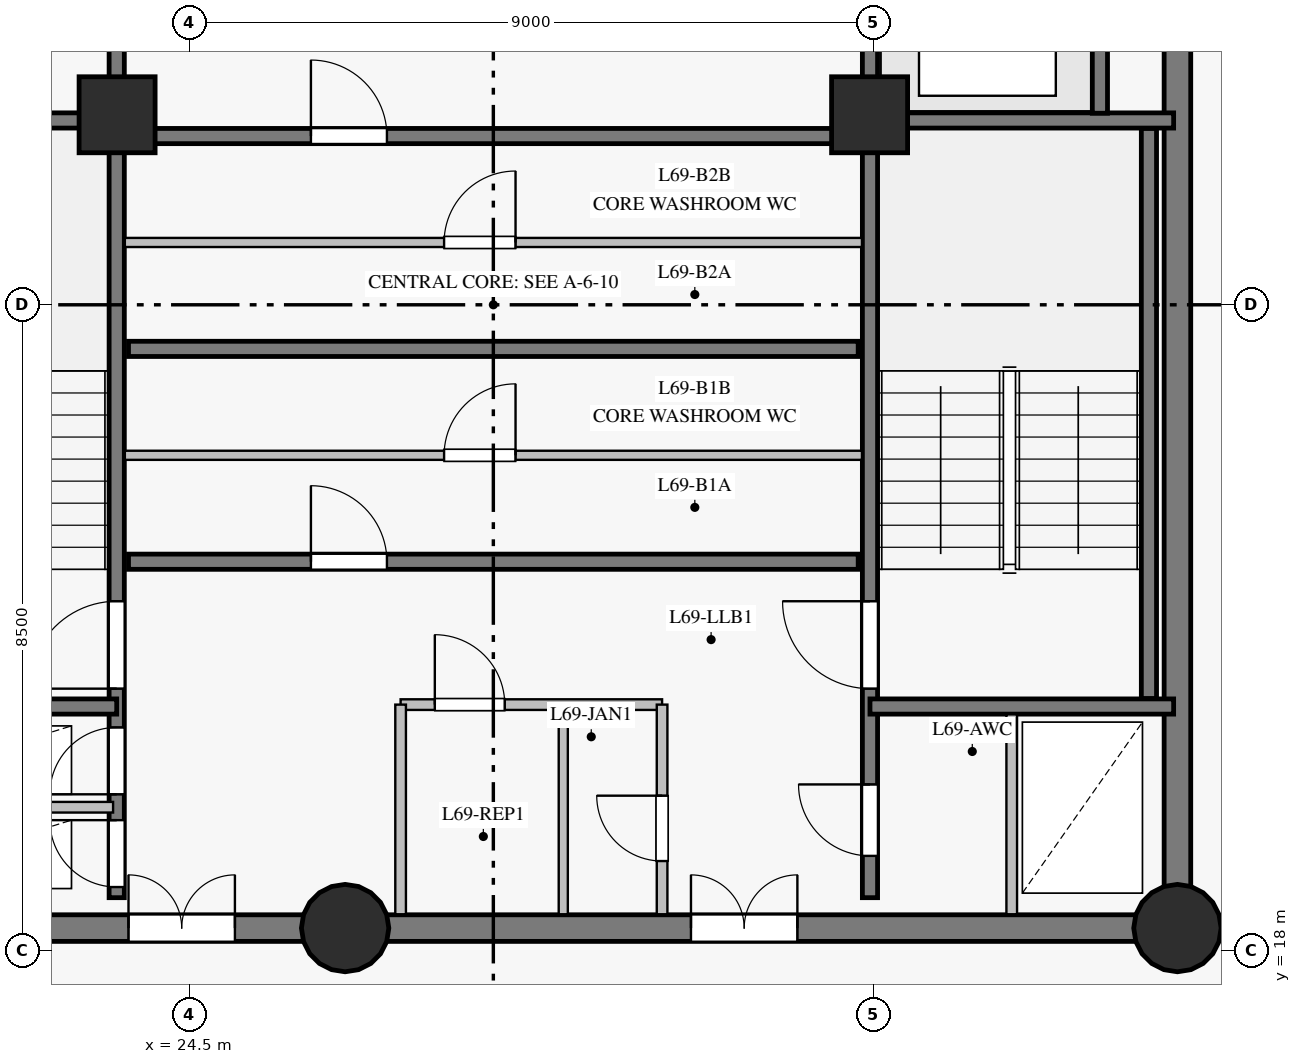
"""IFC4 building model, lengths in metres.
Left out: names, types, materials, properties, quantities, classifications, styles, units other than length and angle.
Written with IfcOpenShell. Run it as: python <this file> out.ifc"""

import sys

from ifc_helpers import new_model, si_unit, direction, frame, frame_2d, origin, origin_with_axes, origin_2d, place, context, subcontext, project, spatial, rectangle, circle, extrude, source, transform, mapped, element, fill, save


model = new_model("IFC4")
c1 = context("Model", 3, precision=1e-05, world=origin(), true_north=direction((0.0, 1.0)))
c2 = subcontext(c1, "Body", "Model", "MODEL_VIEW")
j1 = project(units=[si_unit("LENGTHUNIT", "METRE"), si_unit("PLANEANGLEUNIT", "RADIAN")], contexts=[c1])
p1 = place(None, origin())
s1 = spatial("IfcSite", under=j1, at=p1, CompositionType="ELEMENT")
p2 = place(p1, origin())
s2 = spatial("IfcBuilding", under=s1, at=p2, CompositionType="ELEMENT")
p3 = place(p2, frame((0.0, 0.0, 235.2)))
s3 = spatial("IfcBuildingStorey", under=s2, at=p3, CompositionType="ELEMENT", Elevation=235.2)
p4 = place(p3, frame((19.5, 18.3, 0.0), z_axis=(0.0, 0.0, 1.0), x_axis=(1.0, 0.0, 0.0)))
e1 = element("IfcWall", 1, at=p4, inside=s3, PredefinedType="SHEAR", context=c2, shape_type="SweptSolid", body=[
    extrude(rectangle(XDim=7.05, YDim=0.35, at=frame_2d((3.525, 0.0))), origin(), (0.0, 0.0, 1.0), 2.85),
])
p5 = place(p4, frame((4.2, 0.0, 0.0)))
e2 = element("IfcOpeningElement", 2, at=p5, cuts=e1, PredefinedType="OPENING", context=c2, shape_type="SweptSolid", body=[
    extrude(rectangle(XDim=1.4, YDim=2.2, at=frame_2d((0.7, 1.1))), frame((0.0, 0.185, 0.0), z_axis=(0.0, -1.0, 0.0), x_axis=(1.0, 0.0, 0.0)), (0.0, 0.0, 1.0), 0.37),
])
p6 = place(p3, frame((26.55, 18.3, 0.0), z_axis=(0.0, 0.0, 1.0), x_axis=(1.0, 0.0, 0.0)))
e3 = element("IfcWall", 3, at=p6, inside=s3, PredefinedType="SHEAR", context=c2, shape_type="SweptSolid", body=[
    extrude(rectangle(XDim=10.95, YDim=0.35, at=frame_2d((5.475, 0.0))), origin(), (0.0, 0.0, 1.0), 2.85),
])
p7 = place(p6, frame((4.55, 0.0, 0.0)))
e4 = element("IfcOpeningElement", 4, at=p7, cuts=e3, PredefinedType="OPENING", context=c2, shape_type="SweptSolid", body=[
    extrude(rectangle(XDim=1.4, YDim=2.2, at=frame_2d((0.7, 1.1))), frame((0.0, 0.185, 0.0), z_axis=(0.0, -1.0, 0.0), x_axis=(1.0, 0.0, 0.0)), (0.0, 0.0, 1.0), 0.37),
])
p8 = place(p3, frame((37.5, 18.3, 0.0), z_axis=(0.0, 0.0, 1.0), x_axis=(0.0, 1.0, 0.0)))
e5 = element("IfcWall", 5, at=p8, inside=s3, PredefinedType="SHEAR", context=c2, shape_type="SweptSolid", body=[
    extrude(rectangle(XDim=16.4, YDim=0.35, at=frame_2d((8.2, 0.0))), origin(), (0.0, 0.0, 1.0), 2.85),
])
p9 = place(p8, frame((13.85, 0.0, 0.0)))
e6 = element("IfcOpeningElement", 6, at=p9, cuts=e5, PredefinedType="OPENING", context=c2, shape_type="SweptSolid", body=[
    extrude(rectangle(XDim=1.2, YDim=2.15, at=frame_2d((0.6, 1.075))), frame((0.0, 0.185, 0.0), z_axis=(0.0, -1.0, 0.0), x_axis=(1.0, 0.0, 0.0)), (0.0, 0.0, 1.0), 0.37),
])
m1 = source(origin_with_axes(), c2, "Body", "SweptSolid", [
    extrude(circle(Radius=0.575, at=origin_2d()), origin(), (0.0, 0.0, 1.0), 3.05),
])
for number, where, z_axis, x_axis in (
    (7, (26.55, 18.3, 0.0), (0.0, 0.0, 1.0), (1.0, 0.0, 0.0)),
    (8, (37.5, 18.3, 0.0), (0.0, 0.0, 1.0), (1.0, 0.0, 0.0)),
):
    element("IfcColumn", number, at=place(p3, frame(where, z_axis=z_axis, x_axis=x_axis)), inside=s3, PredefinedType="COLUMN", context=c2, shape_type="MappedRepresentation", body=[
        mapped(m1, transform((0.0, 0.0, 0.0), scale=1.0)),
    ])
m2 = source(origin_with_axes(), c2, "Body", "SweptSolid", [
    extrude(rectangle(XDim=1.0, YDim=1.0, at=origin_2d()), origin(), (0.0, 0.0, 1.0), 3.05),
])
for number, where, z_axis, x_axis in (
    (9, (23.55, 29.0, 0.0), (0.0, 0.0, 1.0), (1.0, 0.0, 0.0)),
    (10, (33.45, 29.0, 0.0), (0.0, 0.0, 1.0), (1.0, 0.0, 0.0)),
):
    element("IfcColumn", number, at=place(p3, frame(where, z_axis=z_axis, x_axis=x_axis)), inside=s3, PredefinedType="COLUMN", context=c2, shape_type="MappedRepresentation", body=[
        mapped(m2, transform((0.0, 0.0, 0.0), scale=1.0)),
    ])
p10 = place(p3, frame((34.467, 7.916, 0.0), z_axis=(0.0, 0.0, 1.0), x_axis=(0.661518096325, 0.749929202148, 0.0)))
e11 = element("IfcWall", 11, at=p10, inside=s3, PredefinedType="SOLIDWALL", context=c2, shape_type="SweptSolid", body=[
    extrude(rectangle(XDim=18.952, YDim=0.28, at=frame_2d((9.476, 0.0))), origin(), (0.0, 0.0, 1.0), 2.85),
])
p11 = place(p10, frame((4.831, 0.0, 0.85)))
e12 = element("IfcOpeningElement", 12, at=p11, cuts=e11, PredefinedType="OPENING", context=c2, shape_type="SweptSolid", body=[
    extrude(rectangle(XDim=1.6, YDim=1.6, at=frame_2d((0.8, 0.8))), frame((0.0, 0.15, 0.0), z_axis=(0.0, -1.0, 0.0), x_axis=(1.0, 0.0, 0.0)), (0.0, 0.0, 1.0), 0.3),
])
p12 = place(p10, frame((12.161, 0.0, 0.85)))
e13 = element("IfcOpeningElement", 13, at=p12, cuts=e11, PredefinedType="OPENING", context=c2, shape_type="SweptSolid", body=[
    extrude(rectangle(XDim=1.6, YDim=1.6, at=frame_2d((0.8, 0.8))), frame((0.0, 0.15, 0.0), z_axis=(0.0, -1.0, 0.0), x_axis=(1.0, 0.0, 0.0)), (0.0, 0.0, 1.0), 0.3),
])
p13 = place(p10, frame((16.489, 0.0, 0.85)))
e14 = element("IfcOpeningElement", 14, at=p13, cuts=e11, PredefinedType="OPENING", context=c2, shape_type="SweptSolid", body=[
    extrude(rectangle(XDim=1.6, YDim=1.6, at=frame_2d((0.8, 0.8))), frame((0.0, 0.15, 0.0), z_axis=(0.0, -1.0, 0.0), x_axis=(1.0, 0.0, 0.0)), (0.0, 0.0, 1.0), 0.3),
])
p14 = place(p10, frame((1.844, 0.0, 0.0)))
e15 = element("IfcOpeningElement", 15, at=p14, cuts=e11, PredefinedType="OPENING", context=c2, shape_type="SweptSolid", body=[
    extrude(rectangle(XDim=1.05, YDim=2.12, at=frame_2d((0.525, 1.06))), frame((0.0, 0.15, 0.0), z_axis=(0.0, -1.0, 0.0), x_axis=(1.0, 0.0, 0.0)), (0.0, 0.0, 1.0), 0.3),
])
p15 = place(p3, frame((23.545, 18.7, 0.0), z_axis=(0.0, 0.0, 1.0), x_axis=(0.0, 1.0, 0.0)))
e16 = element("IfcWall", 16, at=p15, inside=s3, PredefinedType="SHEAR", context=c2, shape_type="SweptSolid", body=[
    extrude(rectangle(XDim=15.6, YDim=0.2, at=frame_2d((7.8, 0.0))), origin(), (0.0, 0.0, 1.0), 2.85),
])
p16 = place(p15, frame((2.75, 0.0, 0.0)))
e17 = element("IfcOpeningElement", 17, at=p16, cuts=e16, PredefinedType="OPENING", context=c2, shape_type="SweptSolid", body=[
    extrude(rectangle(XDim=1.15, YDim=2.15, at=frame_2d((0.575, 1.075))), frame((0.0, 0.11, 0.0), z_axis=(0.0, -1.0, 0.0), x_axis=(1.0, 0.0, 0.0)), (0.0, 0.0, 1.0), 0.22),
])
p17 = place(p15, frame((0.14, 0.0, 0.0)))
e18 = element("IfcOpeningElement", 18, at=p17, cuts=e16, PredefinedType="OPENING", context=c2, shape_type="SweptSolid", body=[
    extrude(rectangle(XDim=0.88, YDim=2.1, at=frame_2d((0.44, 1.05))), frame((0.0, 0.11, 0.0), z_axis=(0.0, -1.0, 0.0), x_axis=(1.0, 0.0, 0.0)), (0.0, 0.0, 1.0), 0.22),
])
p18 = place(p15, frame((1.36, 0.0, 0.0)))
e19 = element("IfcOpeningElement", 19, at=p18, cuts=e16, PredefinedType="OPENING", context=c2, shape_type="SweptSolid", body=[
    extrude(rectangle(XDim=0.88, YDim=2.1, at=frame_2d((0.44, 1.05))), frame((0.0, 0.11, 0.0), z_axis=(0.0, -1.0, 0.0), x_axis=(1.0, 0.0, 0.0)), (0.0, 0.0, 1.0), 0.22),
])
p19 = place(p15, frame((12.1, 0.0, 0.0)))
e20 = element("IfcOpeningElement", 20, at=p19, cuts=e16, PredefinedType="OPENING", context=c2, shape_type="SweptSolid", body=[
    extrude(rectangle(XDim=1.12, YDim=2.15, at=frame_2d((0.56, 1.075))), frame((0.0, 0.11, 0.0), z_axis=(0.0, -1.0, 0.0), x_axis=(1.0, 0.0, 0.0)), (0.0, 0.0, 1.0), 0.22),
])
p20 = place(p15, frame((14.05, 0.0, 0.0)))
e21 = element("IfcOpeningElement", 21, at=p20, cuts=e16, PredefinedType="OPENING", context=c2, shape_type="SweptSolid", body=[
    extrude(rectangle(XDim=1.12, YDim=2.15, at=frame_2d((0.56, 1.075))), frame((0.0, 0.11, 0.0), z_axis=(0.0, -1.0, 0.0), x_axis=(1.0, 0.0, 0.0)), (0.0, 0.0, 1.0), 0.22),
])
p21 = place(p3, frame((33.455, 18.7, 0.0), z_axis=(0.0, 0.0, 1.0), x_axis=(0.0, 1.0, 0.0)))
e22 = element("IfcWall", 22, at=p21, inside=s3, PredefinedType="SHEAR", context=c2, shape_type="SweptSolid", body=[
    extrude(rectangle(XDim=15.6, YDim=0.2, at=frame_2d((7.8, 0.0))), origin(), (0.0, 0.0, 1.0), 2.85),
])
p22 = place(p21, frame((2.75, 0.0, 0.0)))
e23 = element("IfcOpeningElement", 23, at=p22, cuts=e22, PredefinedType="OPENING", context=c2, shape_type="SweptSolid", body=[
    extrude(rectangle(XDim=1.15, YDim=2.15, at=frame_2d((0.575, 1.075))), frame((0.0, 0.11, 0.0), z_axis=(0.0, -1.0, 0.0), x_axis=(1.0, 0.0, 0.0)), (0.0, 0.0, 1.0), 0.22),
])
p23 = place(p21, frame((0.55, 0.0, 0.0)))
e24 = element("IfcOpeningElement", 24, at=p23, cuts=e22, PredefinedType="OPENING", context=c2, shape_type="SweptSolid", body=[
    extrude(rectangle(XDim=0.94, YDim=2.1, at=frame_2d((0.47, 1.05))), frame((0.0, 0.11, 0.0), z_axis=(0.0, -1.0, 0.0), x_axis=(1.0, 0.0, 0.0)), (0.0, 0.0, 1.0), 0.22),
])
p24 = place(p3, frame((23.7, 23.12, 0.0), z_axis=(0.0, 0.0, 1.0), x_axis=(1.0, 0.0, 0.0)))
e25 = element("IfcWall", 25, at=p24, inside=s3, PredefinedType="SHEAR", context=c2, shape_type="SweptSolid", body=[
    extrude(rectangle(XDim=9.6, YDim=0.2, at=frame_2d((4.8, 0.0))), origin(), (0.0, 0.0, 1.0), 2.85),
])
p25 = place(p24, frame((2.4, 0.0, 0.0)))
e26 = element("IfcOpeningElement", 26, at=p25, cuts=e25, PredefinedType="OPENING", context=c2, shape_type="SweptSolid", body=[
    extrude(rectangle(XDim=1.0, YDim=2.15, at=frame_2d((0.5, 1.075))), frame((0.0, 0.11, 0.0), z_axis=(0.0, -1.0, 0.0), x_axis=(1.0, 0.0, 0.0)), (0.0, 0.0, 1.0), 0.22),
])
p26 = place(p3, frame((23.7, 25.92, 0.0), z_axis=(0.0, 0.0, 1.0), x_axis=(1.0, 0.0, 0.0)))
e27 = element("IfcWall", 27, at=p26, inside=s3, PredefinedType="SHEAR", context=c2, shape_type="SweptSolid", body=[
    extrude(rectangle(XDim=9.6, YDim=0.2, at=frame_2d((4.8, 0.0))), origin(), (0.0, 0.0, 1.0), 2.85),
])
p27 = place(p3, frame((23.7, 28.72, 0.0), z_axis=(0.0, 0.0, 1.0), x_axis=(1.0, 0.0, 0.0)))
e28 = element("IfcWall", 28, at=p27, inside=s3, PredefinedType="SHEAR", context=c2, shape_type="SweptSolid", body=[
    extrude(rectangle(XDim=9.6, YDim=0.2, at=frame_2d((4.8, 0.0))), origin(), (0.0, 0.0, 1.0), 2.85),
])
p28 = place(p27, frame((2.4, 0.0, 0.0)))
e29 = element("IfcOpeningElement", 29, at=p28, cuts=e28, PredefinedType="OPENING", context=c2, shape_type="SweptSolid", body=[
    extrude(rectangle(XDim=1.0, YDim=2.15, at=frame_2d((0.5, 1.075))), frame((0.0, 0.11, 0.0), z_axis=(0.0, -1.0, 0.0), x_axis=(1.0, 0.0, 0.0)), (0.0, 0.0, 1.0), 0.22),
])
p29 = place(p3, frame((37.125, 21.32, 0.0), z_axis=(0.0, 0.0, 1.0), x_axis=(0.0, 1.0, 0.0)))
e30 = element("IfcWall", 30, at=p29, inside=s3, PredefinedType="SHEAR", context=c2, shape_type="SweptSolid", body=[
    extrude(rectangle(XDim=7.5, YDim=0.2, at=frame_2d((3.75, 0.0))), origin(), (0.0, 0.0, 1.0), 2.85),
])
for number, where, z_axis, x_axis in (
    (31, (33.455, 21.215, 0.0), (0.0, 0.0, 1.0), (1.0, 0.0, 0.0)),
    (32, (33.455, 28.925, 0.0), (0.0, 0.0, 1.0), (1.0, 0.0, 0.0)),
    (33, (19.55, 21.215, 0.0), (0.0, 0.0, 1.0), (1.0, 0.0, 0.0)),
    (34, (19.55, 28.925, 0.0), (0.0, 0.0, 1.0), (1.0, 0.0, 0.0)),
):
    element("IfcWall", number, at=place(p3, frame(where, z_axis=z_axis, x_axis=x_axis)), inside=s3, PredefinedType="SHEAR", context=c2, shape_type="SweptSolid", body=[
        extrude(rectangle(XDim=3.995, YDim=0.2, at=frame_2d((1.998, 0.0))), origin(), (0.0, 0.0, 1.0), 2.85),
    ])
p30 = place(p3, frame((36.48, 29.02, 0.0), z_axis=(0.0, 0.0, 1.0), x_axis=(0.0, 1.0, 0.0)))
e35 = element("IfcWall", 35, at=p30, inside=s3, PredefinedType="SHEAR", context=c2, shape_type="SweptSolid", body=[
    extrude(rectangle(XDim=2.86, YDim=0.2, at=frame_2d((1.43, 0.0))), origin(), (0.0, 0.0, 1.0), 2.85),
])
p31 = place(p3, frame((23.652, 24.52, 0.0), z_axis=(0.0, 0.0, 1.0), x_axis=(1.0, 0.0, 0.0)))
e36 = element("IfcWall", 36, at=p31, inside=s3, PredefinedType="PARTITIONING", context=c2, shape_type="SweptSolid", body=[
    extrude(rectangle(XDim=9.698, YDim=0.12, at=frame_2d((4.849, 0.0))), origin(), (0.0, 0.0, 1.0), 2.85),
])
p32 = place(p31, frame((4.2, 0.0, 0.0)))
e37 = element("IfcOpeningElement", 37, at=p32, cuts=e36, PredefinedType="OPENING", context=c2, shape_type="SweptSolid", body=[
    extrude(rectangle(XDim=0.94, YDim=2.1, at=frame_2d((0.47, 1.05))), frame((0.0, 0.07, 0.0), z_axis=(0.0, -1.0, 0.0), x_axis=(1.0, 0.0, 0.0)), (0.0, 0.0, 1.0), 0.14),
])
p33 = place(p3, frame((23.652, 27.32, 0.0), z_axis=(0.0, 0.0, 1.0), x_axis=(1.0, 0.0, 0.0)))
e38 = element("IfcWall", 38, at=p33, inside=s3, PredefinedType="PARTITIONING", context=c2, shape_type="SweptSolid", body=[
    extrude(rectangle(XDim=9.698, YDim=0.12, at=frame_2d((4.849, 0.0))), origin(), (0.0, 0.0, 1.0), 2.85),
])
p34 = place(p33, frame((4.2, 0.0, 0.0)))
e39 = element("IfcOpeningElement", 39, at=p34, cuts=e38, PredefinedType="OPENING", context=c2, shape_type="SweptSolid", body=[
    extrude(rectangle(XDim=0.94, YDim=2.1, at=frame_2d((0.47, 1.05))), frame((0.0, 0.07, 0.0), z_axis=(0.0, -1.0, 0.0), x_axis=(1.0, 0.0, 0.0)), (0.0, 0.0, 1.0), 0.14),
])
p35 = place(p3, frame((19.682, 19.89, 0.0), z_axis=(0.0, 0.0, 1.0), x_axis=(1.0, 0.0, 0.0)))
e40 = element("IfcWall", 40, at=p35, inside=s3, PredefinedType="PARTITIONING", context=c2, shape_type="SweptSolid", body=[
    extrude(rectangle(XDim=3.815, YDim=0.14, at=frame_2d((1.908, 0.0))), origin(), (0.0, 0.0, 1.0), 2.85),
])
p36 = place(p3, frame((27.28, 21.24, 0.0), z_axis=(0.0, 0.0, 1.0), x_axis=(1.0, 0.0, 0.0)))
e41 = element("IfcWall", 41, at=p36, inside=s3, PredefinedType="PARTITIONING", context=c2, shape_type="SweptSolid", body=[
    extrude(rectangle(XDim=3.44, YDim=0.14, at=frame_2d((1.72, 0.0))), origin(), (0.0, 0.0, 1.0), 2.85),
])
p37 = place(p36, frame((0.45, 0.0, 0.0)))
e42 = element("IfcOpeningElement", 42, at=p37, cuts=e41, PredefinedType="OPENING", context=c2, shape_type="SweptSolid", body=[
    extrude(rectangle(XDim=0.92, YDim=2.1, at=frame_2d((0.46, 1.05))), frame((0.0, 0.08, 0.0), z_axis=(0.0, -1.0, 0.0), x_axis=(1.0, 0.0, 0.0)), (0.0, 0.0, 1.0), 0.16),
])
p38 = place(p3, frame((27.28, 18.482, 0.0), z_axis=(0.0, 0.0, 1.0), x_axis=(0.0, 1.0, 0.0)))
e43 = element("IfcWall", 43, at=p38, inside=s3, PredefinedType="PARTITIONING", context=c2, shape_type="SweptSolid", body=[
    extrude(rectangle(XDim=2.758, YDim=0.14, at=frame_2d((1.379, 0.0))), origin(), (0.0, 0.0, 1.0), 2.85),
])
p39 = place(p3, frame((30.72, 18.482, 0.0), z_axis=(0.0, 0.0, 1.0), x_axis=(0.0, 1.0, 0.0)))
e44 = element("IfcWall", 44, at=p39, inside=s3, PredefinedType="PARTITIONING", context=c2, shape_type="SweptSolid", body=[
    extrude(rectangle(XDim=2.758, YDim=0.14, at=frame_2d((1.379, 0.0))), origin(), (0.0, 0.0, 1.0), 2.85),
])
p40 = place(p39, frame((0.7, 0.0, 0.0)))
e45 = element("IfcOpeningElement", 45, at=p40, cuts=e44, PredefinedType="OPENING", context=c2, shape_type="SweptSolid", body=[
    extrude(rectangle(XDim=0.86, YDim=2.1, at=frame_2d((0.43, 1.05))), frame((0.0, 0.08, 0.0), z_axis=(0.0, -1.0, 0.0), x_axis=(1.0, 0.0, 0.0)), (0.0, 0.0, 1.0), 0.16),
])
p41 = place(p3, frame((29.42, 18.482, 0.0), z_axis=(0.0, 0.0, 1.0), x_axis=(0.0, 1.0, 0.0)))
e46 = element("IfcWall", 46, at=p41, inside=s3, PredefinedType="PARTITIONING", context=c2, shape_type="SweptSolid", body=[
    extrude(rectangle(XDim=2.687, YDim=0.12, at=frame_2d((1.344, 0.0))), origin(), (0.0, 0.0, 1.0), 2.85),
])
p42 = place(p3, frame((35.32, 18.482, 0.0), z_axis=(0.0, 0.0, 1.0), x_axis=(0.0, 1.0, 0.0)))
e47 = element("IfcWall", 47, at=p42, inside=s3, PredefinedType="PARTITIONING", context=c2, shape_type="SweptSolid", body=[
    extrude(rectangle(XDim=2.629, YDim=0.14, at=frame_2d((1.314, 0.0))), origin(), (0.0, 0.0, 1.0), 2.85),
])
m3 = source(origin_with_axes(), c2, "Body", "SweptSolid", [
    extrude(rectangle(XDim=1.15, YDim=2.15, at=frame_2d((0.575, 1.075))), frame((0.0, 0.025, 0.0), z_axis=(0.0, -1.0, 0.0), x_axis=(1.0, 0.0, 0.0)), (0.0, 0.0, 1.0), 0.05),
])
p43 = place(p16, origin())
e48 = element("IfcDoor", 48, at=p43, inside=s3, OperationType="SINGLE_SWING_LEFT", PredefinedType="DOOR", context=c2, shape_type="MappedRepresentation", body=[
    mapped(m3, transform((0.0, 0.0, 0.0), scale=1.0)),
])
fill(e17, e48)
p44 = place(p22, origin())
e49 = element("IfcDoor", 49, at=p44, inside=s3, OperationType="SINGLE_SWING_RIGHT", PredefinedType="DOOR", context=c2, shape_type="MappedRepresentation", body=[
    mapped(m3, transform((0.0, 0.0, 0.0), scale=1.0)),
])
fill(e23, e49)
m4 = source(origin_with_axes(), c2, "Body", "SweptSolid", [
    extrude(rectangle(XDim=0.88, YDim=2.1, at=frame_2d((0.44, 1.05))), frame((0.0, 0.025, 0.0), z_axis=(0.0, -1.0, 0.0), x_axis=(1.0, 0.0, 0.0)), (0.0, 0.0, 1.0), 0.05),
])
p45 = place(p17, origin())
e50 = element("IfcDoor", 50, at=p45, inside=s3, OperationType="SINGLE_SWING_RIGHT", PredefinedType="DOOR", context=c2, shape_type="MappedRepresentation", body=[
    mapped(m4, transform((0.0, 0.0, 0.0), scale=1.0)),
])
fill(e18, e50)
p46 = place(p18, origin())
e51 = element("IfcDoor", 51, at=p46, inside=s3, OperationType="SINGLE_SWING_LEFT", PredefinedType="DOOR", context=c2, shape_type="MappedRepresentation", body=[
    mapped(m4, transform((0.0, 0.0, 0.0), scale=1.0)),
])
fill(e19, e51)
m5 = source(origin_with_axes(), c2, "Body", "SweptSolid", [
    extrude(rectangle(XDim=1.4, YDim=2.2, at=frame_2d((0.7, 1.1))), frame((0.0, 0.025, 0.0), z_axis=(0.0, -1.0, 0.0), x_axis=(1.0, 0.0, 0.0)), (0.0, 0.0, 1.0), 0.05),
])
p47 = place(p5, origin())
e52 = element("IfcDoor", 52, at=p47, inside=s3, OperationType="DOUBLE_DOOR_SINGLE_SWING", PredefinedType="DOOR", context=c2, shape_type="MappedRepresentation", body=[
    mapped(m5, transform((0.0, 0.0, 0.0), scale=1.0)),
])
fill(e2, e52)
p48 = place(p7, origin())
e53 = element("IfcDoor", 53, at=p48, inside=s3, OperationType="DOUBLE_DOOR_SINGLE_SWING", PredefinedType="DOOR", context=c2, shape_type="MappedRepresentation", body=[
    mapped(m5, transform((0.0, 0.0, 0.0), scale=1.0)),
])
fill(e4, e53)
m6 = source(origin_with_axes(), c2, "Body", "SweptSolid", [
    extrude(rectangle(XDim=0.94, YDim=2.1, at=frame_2d((0.47, 1.05))), frame((0.0, 0.025, 0.0), z_axis=(0.0, -1.0, 0.0), x_axis=(1.0, 0.0, 0.0)), (0.0, 0.0, 1.0), 0.05),
])
p49 = place(p23, origin())
e54 = element("IfcDoor", 54, at=p49, inside=s3, OperationType="SINGLE_SWING_RIGHT", PredefinedType="DOOR", context=c2, shape_type="MappedRepresentation", body=[
    mapped(m6, transform((0.0, 0.0, 0.0), scale=1.0)),
])
fill(e24, e54)
m7 = source(origin_with_axes(), c2, "Body", "SweptSolid", [
    extrude(rectangle(XDim=0.92, YDim=2.1, at=frame_2d((0.46, 1.05))), frame((0.0, 0.025, 0.0), z_axis=(0.0, -1.0, 0.0), x_axis=(1.0, 0.0, 0.0)), (0.0, 0.0, 1.0), 0.05),
])
p50 = place(p37, origin())
e55 = element("IfcDoor", 55, at=p50, inside=s3, OperationType="SINGLE_SWING_LEFT", PredefinedType="DOOR", context=c2, shape_type="MappedRepresentation", body=[
    mapped(m7, transform((0.0, 0.0, 0.0), scale=1.0)),
])
fill(e42, e55)
m8 = source(origin_with_axes(), c2, "Body", "SweptSolid", [
    extrude(rectangle(XDim=0.86, YDim=2.1, at=frame_2d((0.43, 1.05))), frame((0.0, 0.025, 0.0), z_axis=(0.0, -1.0, 0.0), x_axis=(1.0, 0.0, 0.0)), (0.0, 0.0, 1.0), 0.05),
])
p51 = place(p40, origin())
e56 = element("IfcDoor", 56, at=p51, inside=s3, OperationType="SINGLE_SWING_RIGHT", PredefinedType="DOOR", context=c2, shape_type="MappedRepresentation", body=[
    mapped(m8, transform((0.0, 0.0, 0.0), scale=1.0)),
])
fill(e45, e56)
m9 = source(origin_with_axes(), c2, "Body", "SweptSolid", [
    extrude(rectangle(XDim=1.0, YDim=2.15, at=frame_2d((0.5, 1.075))), frame((0.0, 0.025, 0.0), z_axis=(0.0, -1.0, 0.0), x_axis=(1.0, 0.0, 0.0)), (0.0, 0.0, 1.0), 0.05),
])
p52 = place(p25, origin())
e57 = element("IfcDoor", 57, at=p52, inside=s3, OperationType="SINGLE_SWING_LEFT", PredefinedType="DOOR", context=c2, shape_type="MappedRepresentation", body=[
    mapped(m9, transform((0.0, 0.0, 0.0), scale=1.0)),
])
fill(e26, e57)
p53 = place(p32, origin())
e58 = element("IfcDoor", 58, at=p53, inside=s3, OperationType="SINGLE_SWING_RIGHT", PredefinedType="DOOR", context=c2, shape_type="MappedRepresentation", body=[
    mapped(m6, transform((0.0, 0.0, 0.0), scale=1.0)),
])
fill(e37, e58)
p54 = place(p28, origin())
e59 = element("IfcDoor", 59, at=p54, inside=s3, OperationType="SINGLE_SWING_LEFT", PredefinedType="DOOR", context=c2, shape_type="MappedRepresentation", body=[
    mapped(m9, transform((0.0, 0.0, 0.0), scale=1.0)),
])
fill(e29, e59)
p55 = place(p34, origin())
e60 = element("IfcDoor", 60, at=p55, inside=s3, OperationType="SINGLE_SWING_RIGHT", PredefinedType="DOOR", context=c2, shape_type="MappedRepresentation", body=[
    mapped(m6, transform((0.0, 0.0, 0.0), scale=1.0)),
])
fill(e39, e60)
save(model, sys.argv[1])
